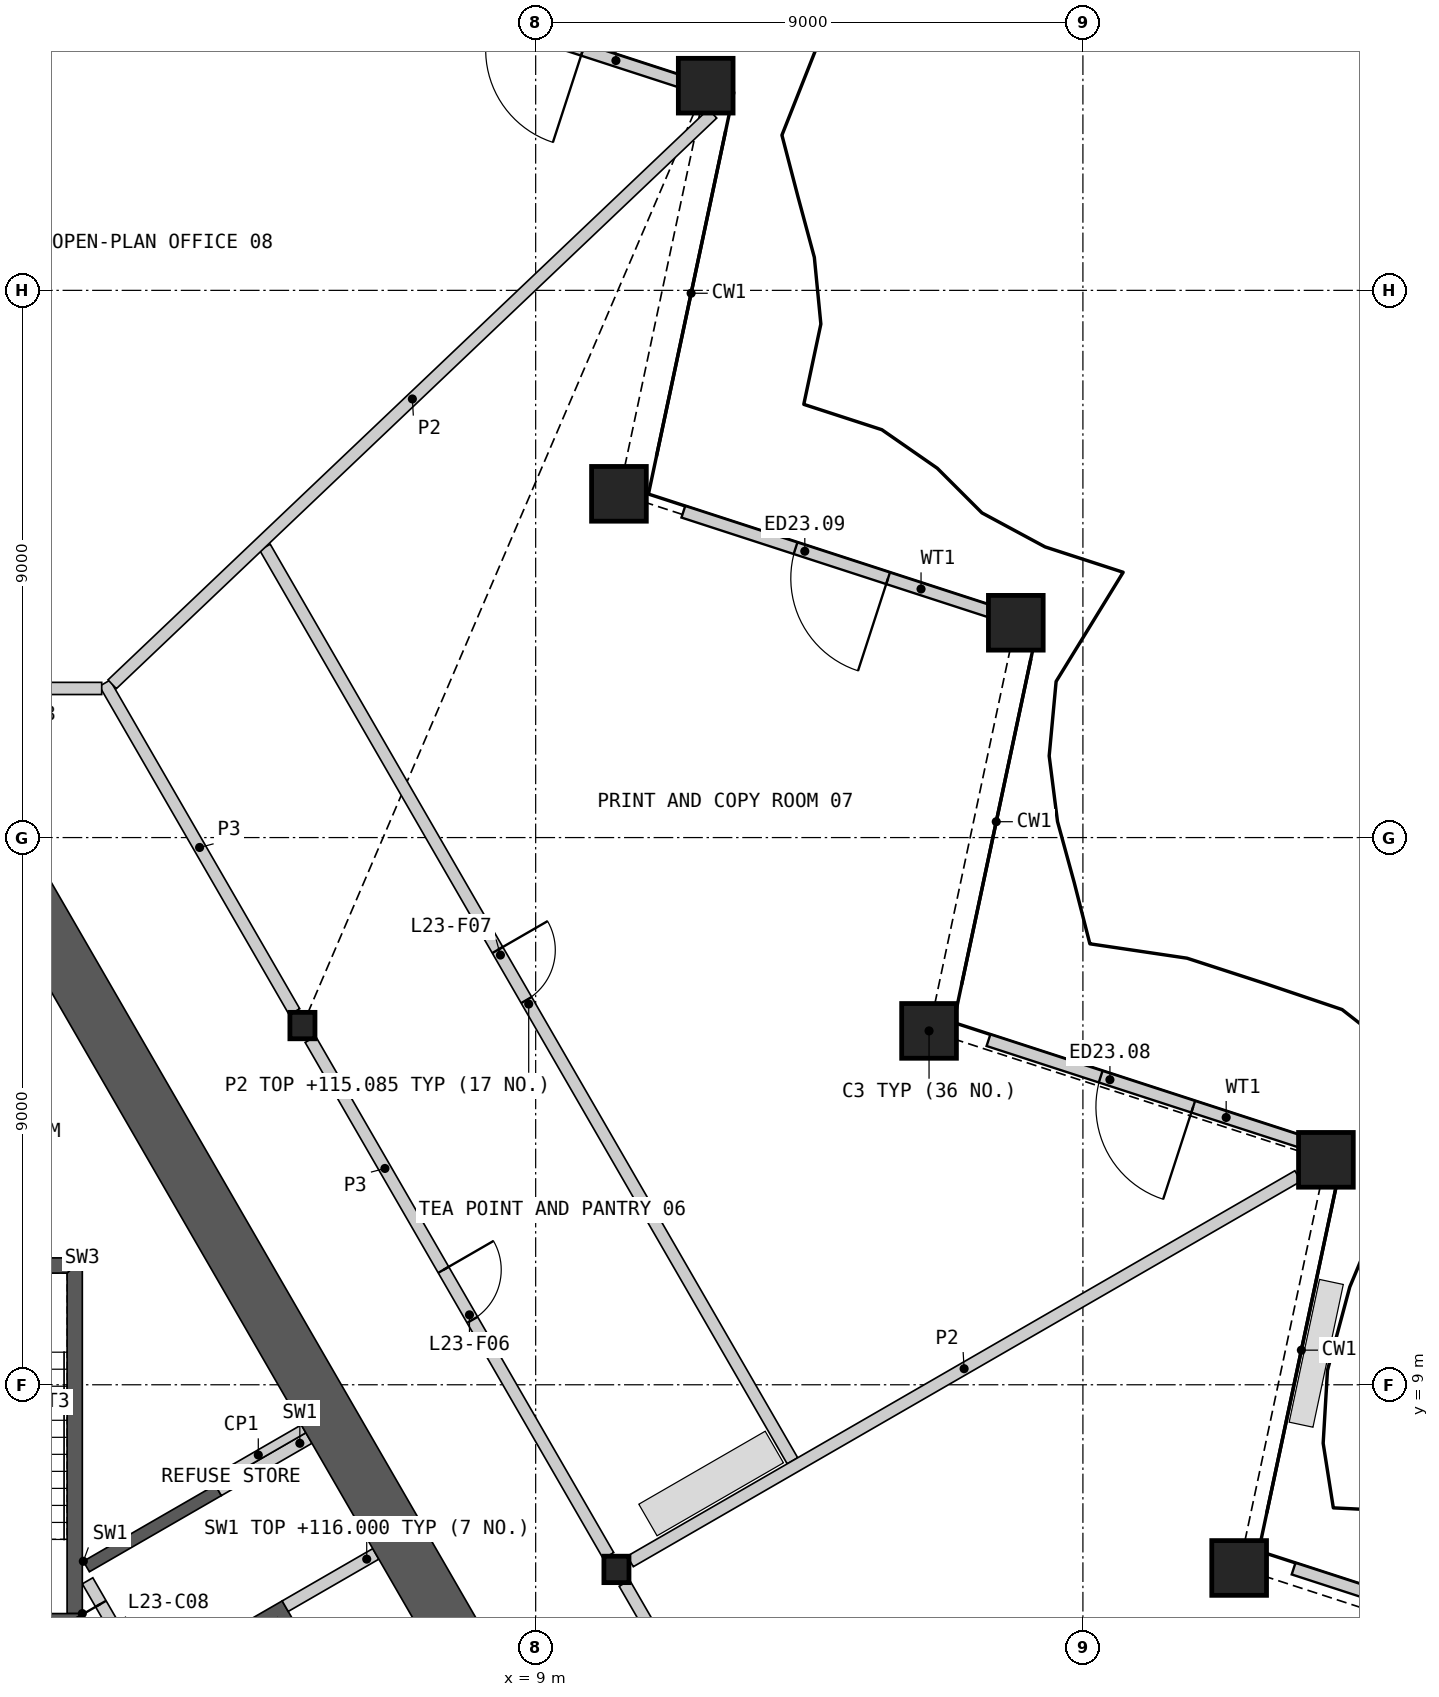
"""IFC4 building model, lengths in metres.
Left out: names, types, materials, properties, quantities, classifications, styles, units other than length and angle.
Written with IfcOpenShell. Run it as: python <this file> out.ifc"""

import sys

from ifc_helpers import new_model, si_unit, direction, frame, frame_2d, origin, origin_2d, place, context, subcontext, project, spatial, polyline, rectangle, hollow_rectangle, i_section, outline, extrude, element, fill, save


model = new_model("IFC4")
c1 = context("Model", 3, precision=1e-05, world=origin(), true_north=direction((0.0, 1.0)))
c2 = subcontext(c1, "Body", "Model", "MODEL_VIEW")
j1 = project(units=[si_unit("LENGTHUNIT", "METRE"), si_unit("PLANEANGLEUNIT", "RADIAN")], contexts=[c1])
p1 = place(None, origin())
s1 = spatial("IfcSite", under=j1, at=p1, CompositionType="ELEMENT")
p2 = place(p1, origin())
s2 = spatial("IfcBuilding", under=s1, at=p2, CompositionType="ELEMENT")
p3 = place(p2, frame((0.0, 0.0, 112.2)))
s3 = spatial("IfcBuildingStorey", under=s2, at=p3, CompositionType="ELEMENT", Elevation=112.2)
for number, where, z_axis, x_axis in (
    (1, (20.57, 5.987, 0.0), (0.0, 0.0, 1.0), (1.0, 0.0, 0.0)),
    (2, (21.996, 12.699, 0.0), (0.0, 0.0, 1.0), (1.0, 0.0, 0.0)),
    (3, (15.469, 14.82, 0.0), (0.0, 0.0, 1.0), (1.0, 0.0, 0.0)),
    (4, (16.896, 21.533, 0.0), (0.0, 0.0, 1.0), (1.0, 0.0, 0.0)),
    (5, (10.37, 23.654, 0.0), (0.0, 0.0, 1.0), (1.0, 0.0, 0.0)),
    (6, (11.796, 30.366, 0.0), (0.0, 0.0, 1.0), (1.0, 0.0, 0.0)),
):
    element("IfcColumn", number, at=place(p3, frame(where, z_axis=z_axis, x_axis=x_axis)), inside=s3, PredefinedType="COLUMN", context=c2, shape_type="SweptSolid", body=[
        extrude(hollow_rectangle(XDim=0.9, YDim=0.9, WallThickness=0.06, at=origin_2d()), origin(), (0.0, 0.0, 1.0), 4.2),
    ])
for number, where, z_axis, x_axis in (
    (7, (10.328, 5.963, 0.0), (0.0, 0.0, 1.0), (1.0, 0.0, 0.0)),
    (8, (5.164, 14.908, 0.0), (0.0, 0.0, 1.0), (1.0, 0.0, 0.0)),
):
    element("IfcColumn", number, at=place(p3, frame(where, z_axis=z_axis, x_axis=x_axis)), inside=s3, PredefinedType="COLUMN", context=c2, shape_type="SweptSolid", body=[
        extrude(i_section(OverallWidth=0.412, OverallDepth=0.435, WebThickness=0.036, FlangeThickness=0.057, at=origin_2d()), origin(), (0.0, 0.0, 1.0), 4.2),
    ])
p4 = place(p3, frame((26.677, 4.282, 0.0), z_axis=(0.0, 0.0, 1.0), x_axis=(-0.951052727247, 0.309028655624, 0.0)))
e9 = element("IfcWall", 9, at=p4, inside=s3, PredefinedType="SOLIDWALL", context=c2, shape_type="SweptSolid", body=[
    extrude(rectangle(XDim=5.48, YDim=0.2, at=frame_2d((2.74, 0.0))), origin(), (0.0, 0.0, 1.0), 3.189),
])
p5 = place(p4, frame((1.94, 0.0, 0.0)))
e10 = element("IfcOpeningElement", 10, at=p5, cuts=e9, PredefinedType="OPENING", context=c2, shape_type="SweptSolid", body=[
    extrude(rectangle(XDim=1.6, YDim=2.4, at=frame_2d((0.8, 1.2))), frame((0.0, 0.11, 0.0), z_axis=(0.0, -1.0, 0.0), x_axis=(1.0, 0.0, 0.0)), (0.0, 0.0, 1.0), 0.22),
])
p6 = place(p3, frame((21.659, 12.973, 0.0), z_axis=(0.0, 0.0, 1.0), x_axis=(-0.951065819309, 0.308988361175, 0.0)))
e11 = element("IfcWall", 11, at=p6, inside=s3, PredefinedType="SOLIDWALL", context=c2, shape_type="SweptSolid", body=[
    extrude(rectangle(XDim=5.48, YDim=0.2, at=frame_2d((2.74, 0.0))), origin(), (0.0, 0.0, 1.0), 3.189),
])
p7 = place(p6, frame((1.94, 0.0, 0.0)))
e12 = element("IfcOpeningElement", 12, at=p7, cuts=e11, PredefinedType="OPENING", context=c2, shape_type="SweptSolid", body=[
    extrude(rectangle(XDim=1.6, YDim=2.4, at=frame_2d((0.8, 1.2))), frame((0.0, 0.11, 0.0), z_axis=(0.0, -1.0, 0.0), x_axis=(1.0, 0.0, 0.0)), (0.0, 0.0, 1.0), 0.22),
])
p8 = place(p3, frame((16.641, 21.665, 0.0), z_axis=(0.0, 0.0, 1.0), x_axis=(-0.951052727247, 0.309028655624, 0.0)))
e13 = element("IfcWall", 13, at=p8, inside=s3, PredefinedType="SOLIDWALL", context=c2, shape_type="SweptSolid", body=[
    extrude(rectangle(XDim=5.48, YDim=0.2, at=frame_2d((2.74, 0.0))), origin(), (0.0, 0.0, 1.0), 3.189),
])
p9 = place(p8, frame((1.94, 0.0, 0.0)))
e14 = element("IfcOpeningElement", 14, at=p9, cuts=e13, PredefinedType="OPENING", context=c2, shape_type="SweptSolid", body=[
    extrude(rectangle(XDim=1.6, YDim=2.4, at=frame_2d((0.8, 1.2))), frame((0.0, 0.11, 0.0), z_axis=(0.0, -1.0, 0.0), x_axis=(1.0, 0.0, 0.0)), (0.0, 0.0, 1.0), 0.22),
])
p10 = place(p3, frame((11.623, 30.356, 0.0), z_axis=(0.0, 0.0, 1.0), x_axis=(-0.951052727247, 0.309028655624, 0.0)))
e15 = element("IfcWall", 15, at=p10, inside=s3, PredefinedType="SOLIDWALL", context=c2, shape_type="SweptSolid", body=[
    extrude(rectangle(XDim=5.48, YDim=0.2, at=frame_2d((2.74, 0.0))), origin(), (0.0, 0.0, 1.0), 3.189),
])
p11 = place(p10, frame((1.94, 0.0, 0.0)))
e16 = element("IfcOpeningElement", 16, at=p11, cuts=e15, PredefinedType="OPENING", context=c2, shape_type="SweptSolid", body=[
    extrude(rectangle(XDim=1.6, YDim=2.4, at=frame_2d((0.8, 1.2))), frame((0.0, 0.11, 0.0), z_axis=(0.0, -1.0, 0.0), x_axis=(1.0, 0.0, 0.0)), (0.0, 0.0, 1.0), 0.22),
])
p12 = place(p3, origin())
e17 = element("IfcWall", 17, at=p12, inside=s3, PredefinedType="SHEAR", context=c2, shape_type="SweptSolid", body=[
    extrude(outline(polyline([(1.561, 6.097), (3.731, 7.35), (3.831, 7.177), (1.66, 5.924), (1.561, 6.097)])), origin(), (0.0, 0.0, 1.0), 3.8),
])
p13 = place(p3, origin())
e18 = element("IfcWall", 18, at=p13, inside=s3, PredefinedType="SHEAR", context=c2, shape_type="SweptSolid", body=[
    extrude(outline(polyline([(2.66, 4.192), (4.831, 5.445), (8.231, -0.444), (6.061, -1.697), (5.96, -1.524), (7.952, -0.374), (6.952, 1.358), (4.96, 0.208), (4.861, 0.381), (6.852, 1.531), (5.852, 3.263), (3.861, 2.113), (3.76, 2.287), (5.752, 3.437), (4.752, 5.169), (2.76, 4.019), (2.66, 4.192)])), origin(), (0.0, 0.0, 1.0), 3.8),
])
p14 = place(p3, frame((5.817, -1.476, 0.0), z_axis=(0.0, 0.0, 1.0), x_axis=(-0.500002616675, 0.866023893041, 0.0)))
e19 = element("IfcWall", 19, at=p14, inside=s3, PredefinedType="SOLIDWALL", context=c2, shape_type="SweptSolid", body=[
    extrude(rectangle(XDim=8.373, YDim=0.2, at=frame_2d((4.187, 0.0))), origin(), (0.0, 0.0, 1.0), 3.8),
])
p15 = place(p14, frame((0.337, 0.0, 0.0)))
e20 = element("IfcOpeningElement", 20, at=p15, cuts=e19, PredefinedType="OPENING", context=c2, shape_type="SweptSolid", body=[
    extrude(rectangle(XDim=1.1, YDim=2.1, at=frame_2d((0.55, 1.05))), frame((0.0, 0.11, 0.0), z_axis=(0.0, -1.0, 0.0), x_axis=(1.0, 0.0, 0.0)), (0.0, 0.0, 1.0), 0.22),
])
p16 = place(p14, frame((2.537, 0.0, 0.0)))
e21 = element("IfcOpeningElement", 21, at=p16, cuts=e19, PredefinedType="OPENING", context=c2, shape_type="SweptSolid", body=[
    extrude(rectangle(XDim=1.1, YDim=2.1, at=frame_2d((0.55, 1.05))), frame((0.0, 0.11, 0.0), z_axis=(0.0, -1.0, 0.0), x_axis=(1.0, 0.0, 0.0)), (0.0, 0.0, 1.0), 0.22),
])
p17 = place(p14, frame((4.737, 0.0, 0.0)))
e22 = element("IfcOpeningElement", 22, at=p17, cuts=e19, PredefinedType="OPENING", context=c2, shape_type="SweptSolid", body=[
    extrude(rectangle(XDim=1.1, YDim=2.1, at=frame_2d((0.55, 1.05))), frame((0.0, 0.11, 0.0), z_axis=(0.0, -1.0, 0.0), x_axis=(1.0, 0.0, 0.0)), (0.0, 0.0, 1.0), 0.22),
])
p18 = place(p14, frame((7.037, 0.0, 0.0)))
e23 = element("IfcOpeningElement", 23, at=p18, cuts=e19, PredefinedType="OPENING", context=c2, shape_type="SweptSolid", body=[
    extrude(rectangle(XDim=0.9, YDim=2.1, at=frame_2d((0.45, 1.05))), frame((0.0, 0.11, 0.0), z_axis=(0.0, -1.0, 0.0), x_axis=(1.0, 0.0, 0.0)), (0.0, 0.0, 1.0), 0.22),
])
for number, where, z_axis, x_axis in (
    (24, (4.881, 5.358, 0.0), (0.0, 0.0, 1.0), (0.866, 0.5, 0.0)),
    (25, (3.781, 7.263, 0.0), (0.0, 0.0, 1.0), (0.866, 0.5, 0.0)),
):
    element("IfcWall", number, at=place(p3, frame(where, z_axis=z_axis, x_axis=x_axis)), inside=s3, PredefinedType="SHEAR", context=c2, shape_type="SweptSolid", body=[
        extrude(rectangle(XDim=1.72, YDim=0.2, at=frame_2d((0.86, 0.0))), origin(), (0.0, 0.0, 1.0), 3.8),
    ])
p19 = place(p3, origin())
e26 = element("IfcWall", 26, at=p19, inside=s3, PredefinedType="SHEAR", context=c2, shape_type="SweptSolid", body=[
    extrude(outline(polyline([(1.544, 5.237), (1.544, 11.087), (1.294, 10.837), (1.294, 5.237), (1.544, 5.237)])), origin(), (0.0, 0.0, 1.0), 3.8),
])
p20 = place(p3, origin())
e27 = element("IfcWall", 27, at=p20, inside=s3, PredefinedType="SHEAR", context=c2, shape_type="SweptSolid", body=[
    extrude(outline(polyline([(1.544, 11.087), (-1.544, 11.087), (-1.294, 10.837), (1.294, 10.837), (1.544, 11.087)])), origin(), (0.0, 0.0, 1.0), 3.8),
])
p21 = place(p3, frame((1.544, 5.112, 0.0), z_axis=(0.0, 0.0, 1.0), x_axis=(-1.0, 0.0, 0.0)))
e28 = element("IfcWall", 28, at=p21, inside=s3, PredefinedType="SHEAR", context=c2, shape_type="SweptSolid", body=[
    extrude(rectangle(XDim=3.088, YDim=0.25, at=frame_2d((1.544, 0.0))), origin(), (0.0, 0.0, 1.0), 3.8),
])
p22 = place(p21, frame((0.994, 0.0, 0.0)))
e29 = element("IfcOpeningElement", 29, at=p22, cuts=e28, PredefinedType="OPENING", context=c2, shape_type="SweptSolid", body=[
    extrude(rectangle(XDim=1.1, YDim=2.1, at=frame_2d((0.55, 1.05))), frame((0.0, 0.135, 0.0), z_axis=(0.0, -1.0, 0.0), x_axis=(1.0, 0.0, 0.0)), (0.0, 0.0, 1.0), 0.27),
])
p23 = place(p3, frame((3.693, 7.415, 0.0), z_axis=(0.0, 0.0, 1.0), x_axis=(0.866024871741, 0.500000921525, 0.0)))
e30 = element("IfcWall", 30, at=p23, inside=s3, PredefinedType="PARTITIONING", context=c2, shape_type="SweptSolid", body=[
    extrude(rectangle(XDim=1.72, YDim=0.15, at=frame_2d((0.86, 0.0))), origin(), (0.0, 0.0, 1.0), 3.8),
])
p24 = place(p3, frame((7.91, 4.451, 0.0), z_axis=(0.0, 0.0, 1.0), x_axis=(-0.500005799286, 0.866022055539, 0.0)))
e31 = element("IfcWall", 31, at=p24, inside=s3, PredefinedType="SHEAR", context=c2, shape_type="SweptSolid", body=[
    extrude(rectangle(XDim=15.041, YDim=0.9, at=frame_2d((7.521, 0.0))), origin(), (0.0, 0.0, 1.0), 3.8),
])
p25 = place(p3, frame((10.46, 5.736, 0.0), z_axis=(0.0, 0.0, 1.0), x_axis=(0.500004141693, -0.866023012564, 0.0)))
e32 = element("IfcWall", 32, at=p25, inside=s3, PredefinedType="PARTITIONING", context=c2, shape_type="SweptSolid", body=[
    extrude(rectangle(XDim=9.803, YDim=0.2, at=frame_2d((4.902, 0.0))), origin(), (0.0, 0.0, 1.0), 3.8),
])
p26 = place(p25, frame((4.352, 0.0, 0.0)))
e33 = element("IfcOpeningElement", 33, at=p26, cuts=e32, PredefinedType="OPENING", context=c2, shape_type="SweptSolid", body=[
    extrude(rectangle(XDim=1.0, YDim=2.1, at=frame_2d((0.5, 1.05))), frame((0.0, 0.11, 0.0), z_axis=(0.0, -1.0, 0.0), x_axis=(1.0, 0.0, 0.0)), (0.0, 0.0, 1.0), 0.22),
])
p27 = place(p3, frame((5.295, 14.68, 0.0), z_axis=(0.0, 0.0, 1.0), x_axis=(0.500012035596, -0.866018454918, 0.0)))
e34 = element("IfcWall", 34, at=p27, inside=s3, PredefinedType="PARTITIONING", context=c2, shape_type="SweptSolid", body=[
    extrude(rectangle(XDim=9.803, YDim=0.2, at=frame_2d((4.902, 0.0))), origin(), (0.0, 0.0, 1.0), 3.8),
])
p28 = place(p27, frame((4.376, 0.0, 0.0)))
e35 = element("IfcOpeningElement", 35, at=p28, cuts=e34, PredefinedType="OPENING", context=c2, shape_type="SweptSolid", body=[
    extrude(rectangle(XDim=0.95, YDim=2.1, at=frame_2d((0.475, 1.05))), frame((0.0, 0.11, 0.0), z_axis=(0.0, -1.0, 0.0), x_axis=(1.0, 0.0, 0.0)), (0.0, 0.0, 1.0), 0.22),
])
p29 = place(p3, frame((1.913, 20.539, 0.0), z_axis=(0.0, 0.0, 1.0), x_axis=(0.499980978912, -0.866036385336, 0.0)))
e36 = element("IfcWall", 36, at=p29, inside=s3, PredefinedType="PARTITIONING", context=c2, shape_type="SweptSolid", body=[
    extrude(rectangle(XDim=6.24, YDim=0.2, at=frame_2d((3.12, 0.0))), origin(), (0.0, 0.0, 1.0), 3.8),
])
p30 = place(p3, frame((-1.863, 20.453, 0.0), z_axis=(0.0, 0.0, 1.0), x_axis=(1.0, 0.0, 0.0)))
e37 = element("IfcWall", 37, at=p30, inside=s3, PredefinedType="PARTITIONING", context=c2, shape_type="SweptSolid", body=[
    extrude(rectangle(XDim=3.726, YDim=0.2, at=frame_2d((1.863, 0.0))), origin(), (0.0, 0.0, 1.0), 3.8),
])
p31 = place(p30, frame((0.963, 0.0, 0.0)))
e38 = element("IfcOpeningElement", 38, at=p31, cuts=e37, PredefinedType="OPENING", context=c2, shape_type="SweptSolid", body=[
    extrude(rectangle(XDim=1.8, YDim=2.1, at=frame_2d((0.9, 1.05))), frame((0.0, 0.11, 0.0), z_axis=(0.0, -1.0, 0.0), x_axis=(1.0, 0.0, 0.0)), (0.0, 0.0, 1.0), 0.22),
])
p32 = place(p3, frame((4.548, 22.775, 0.0), z_axis=(0.0, 0.0, 1.0), x_axis=(0.499999764473, -0.866025539766, 0.0)))
e39 = element("IfcWall", 39, at=p32, inside=s3, PredefinedType="PARTITIONING", context=c2, shape_type="SweptSolid", body=[
    extrude(rectangle(XDim=17.35, YDim=0.2, at=frame_2d((8.675, 0.0))), origin(), (0.0, 0.0, 1.0), 2.885),
])
p33 = place(p32, frame((7.65, 0.0, 0.0)))
e40 = element("IfcOpeningElement", 40, at=p33, cuts=e39, PredefinedType="OPENING", context=c2, shape_type="SweptSolid", body=[
    extrude(rectangle(XDim=0.95, YDim=2.1, at=frame_2d((0.475, 1.05))), frame((0.0, 0.11, 0.0), z_axis=(0.0, -1.0, 0.0), x_axis=(1.0, 0.0, 0.0)), (0.0, 0.0, 1.0), 0.22),
])
p34 = place(p3, frame((2.035, 20.521, 0.0), z_axis=(0.0, 0.0, 1.0), x_axis=(0.724819524984, 0.688938789881, 0.0)))
e41 = element("IfcWall", 41, at=p34, inside=s3, PredefinedType="PARTITIONING", context=c2, shape_type="SweptSolid", body=[
    extrude(rectangle(XDim=13.622, YDim=0.2, at=frame_2d((6.811, 0.0))), origin(), (0.0, 0.0, 1.0), 2.885),
])
p35 = place(p3, frame((10.556, 6.094, 0.0), z_axis=(0.0, 0.0, 1.0), x_axis=(0.86602461759, 0.500001361726, 0.0)))
e42 = element("IfcWall", 42, at=p35, inside=s3, PredefinedType="PARTITIONING", context=c2, shape_type="SweptSolid", body=[
    extrude(rectangle(XDim=12.679, YDim=0.2, at=frame_2d((6.34, 0.0))), origin(), (0.0, 0.0, 1.0), 2.885),
])
p36 = place(p7, origin())
e43 = element("IfcDoor", 43, at=p36, inside=s3, OperationType="DOUBLE_DOOR_SINGLE_SWING", PredefinedType="DOOR", context=c2, shape_type="SweptSolid", body=[
    extrude(rectangle(XDim=1.6, YDim=2.4, at=frame_2d((0.8, 1.2))), frame((0.0, 0.025, 0.0), z_axis=(0.0, -1.0, 0.0), x_axis=(1.0, 0.0, 0.0)), (0.0, 0.0, 1.0), 0.05),
])
fill(e12, e43)
p37 = place(p9, origin())
e44 = element("IfcDoor", 44, at=p37, inside=s3, OperationType="DOUBLE_DOOR_SINGLE_SWING", PredefinedType="DOOR", context=c2, shape_type="SweptSolid", body=[
    extrude(rectangle(XDim=1.6, YDim=2.4, at=frame_2d((0.8, 1.2))), frame((0.0, 0.025, 0.0), z_axis=(0.0, -1.0, 0.0), x_axis=(1.0, 0.0, 0.0)), (0.0, 0.0, 1.0), 0.05),
])
fill(e14, e44)
p38 = place(p18, origin())
e45 = element("IfcDoor", 45, at=p38, inside=s3, OperationType="SINGLE_SWING_RIGHT", PredefinedType="DOOR", context=c2, shape_type="SweptSolid", body=[
    extrude(rectangle(XDim=0.9, YDim=2.1, at=frame_2d((0.45, 1.05))), frame((0.0, 0.025, 0.0), z_axis=(0.0, -1.0, 0.0), x_axis=(1.0, 0.0, 0.0)), (0.0, 0.0, 1.0), 0.05),
])
fill(e23, e45)
p39 = place(p28, origin())
e46 = element("IfcDoor", 46, at=p39, inside=s3, OperationType="SINGLE_SWING_LEFT", PredefinedType="DOOR", context=c2, shape_type="SweptSolid", body=[
    extrude(rectangle(XDim=0.95, YDim=2.1, at=frame_2d((0.475, 1.05))), frame((0.0, 0.025, 0.0), z_axis=(0.0, -1.0, 0.0), x_axis=(1.0, 0.0, 0.0)), (0.0, 0.0, 1.0), 0.05),
])
fill(e35, e46)
p40 = place(p33, origin())
e47 = element("IfcDoor", 47, at=p40, inside=s3, OperationType="SINGLE_SWING_LEFT", PredefinedType="DOOR", context=c2, shape_type="SweptSolid", body=[
    extrude(rectangle(XDim=0.95, YDim=2.1, at=frame_2d((0.475, 1.05))), frame((0.0, 0.025, 0.0), z_axis=(0.0, -1.0, 0.0), x_axis=(1.0, 0.0, 0.0)), (0.0, 0.0, 1.0), 0.05),
])
fill(e40, e47)
save(model, sys.argv[1])
